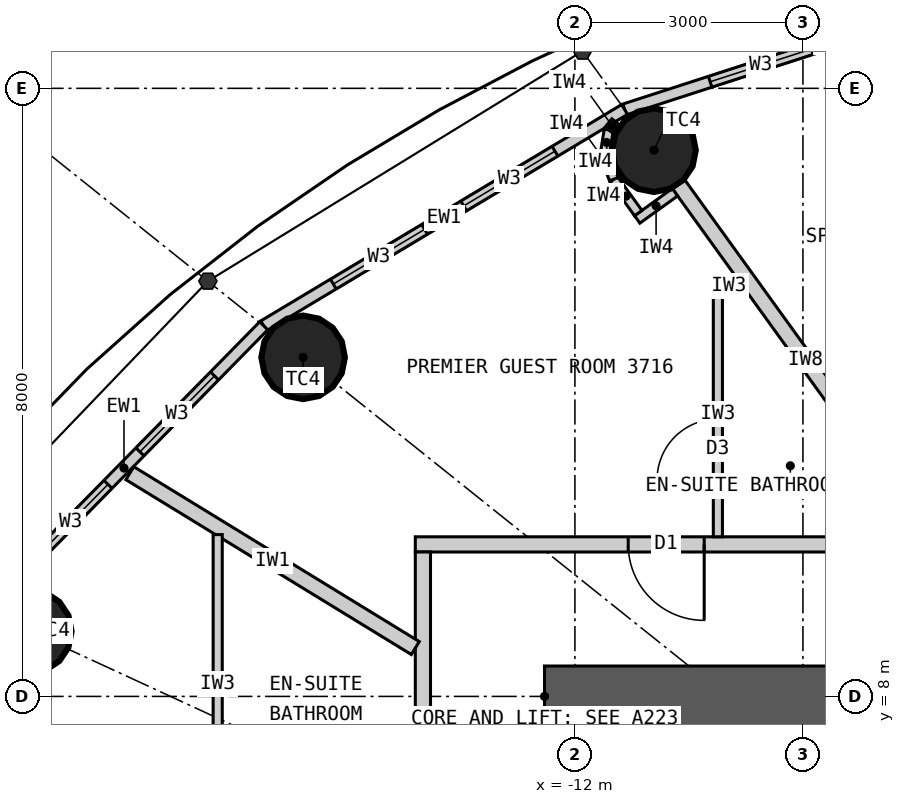
"""IFC4 building model, lengths in metres.
Left out: names, types, materials, properties, quantities, classifications, styles, units other than length and angle.
Written with IfcOpenShell. Run it as: python <this file> out.ifc"""

import sys

from ifc_helpers import new_model, si_unit, direction, frame, frame_2d, origin, origin_2d, place, context, subcontext, project, spatial, rectangle, circle, extrude, element, fill, save


model = new_model("IFC4")
c1 = context("Model", 3, precision=1e-05, world=origin(), true_north=direction((0.0, 1.0)))
c2 = subcontext(c1, "Body", "Model", "MODEL_VIEW")
j1 = project(units=[si_unit("LENGTHUNIT", "METRE"), si_unit("PLANEANGLEUNIT", "RADIAN")], contexts=[c1])
p1 = place(None, origin())
s1 = spatial("IfcSite", under=j1, at=p1, CompositionType="ELEMENT")
p2 = place(p1, origin())
s2 = spatial("IfcBuilding", under=s1, at=p2, CompositionType="ELEMENT")
p3 = place(p2, frame((0.0, 0.0, 143.4)))
s3 = spatial("IfcBuildingStorey", under=s2, at=p3, CompositionType="ELEMENT", Elevation=143.4)
for number, where, z_axis, x_axis in (
    (1, (-10.96, 15.186, 0.0), (0.0, 0.0, 1.0), (1.0, 0.0, 0.0)),
    (2, (-15.576, 12.461, 0.0), (0.0, 0.0, 1.0), (1.0, 0.0, 0.0)),
    (3, (-19.172, 8.855, 0.0), (0.0, 0.0, 1.0), (1.0, 0.0, 0.0)),
):
    element("IfcColumn", number, at=place(p3, frame(where, z_axis=z_axis, x_axis=x_axis)), inside=s3, PredefinedType="COLUMN", context=c2, shape_type="SweptSolid", body=[
        extrude(circle(Radius=0.55, at=origin_2d()), origin(), (0.0, 0.0, 1.0), 3.3),
    ])
p4 = place(p3, frame((-12.4, 8.0, 0.0), z_axis=(0.0, 0.0, 1.0), x_axis=(1.0, 0.0, 0.0)))
e4 = element("IfcWall", 4, at=p4, inside=s3, PredefinedType="SHEAR", context=c2, shape_type="SweptSolid", body=[
    extrude(rectangle(XDim=24.8, YDim=0.8, at=frame_2d((12.4, 0.0))), origin(), (0.0, 0.0, 1.0), 3.3),
])
p5 = place(p4, frame((11.1, 0.0, 0.0)))
e5 = element("IfcOpeningElement", 5, at=p5, cuts=e4, PredefinedType="OPENING", context=c2, shape_type="SweptSolid", body=[
    extrude(rectangle(XDim=1.2, YDim=2.2, at=frame_2d((0.6, 1.1))), frame((0.0, 0.41, 0.0), z_axis=(0.0, -1.0, 0.0), x_axis=(1.0, 0.0, 0.0)), (0.0, 0.0, 1.0), 0.82),
])
p6 = place(p4, frame((18.7, 0.0, 0.0)))
e6 = element("IfcOpeningElement", 6, at=p6, cuts=e4, PredefinedType="OPENING", context=c2, shape_type="SweptSolid", body=[
    extrude(rectangle(XDim=0.9, YDim=2.2, at=frame_2d((0.45, 1.1))), frame((0.0, 0.41, 0.0), z_axis=(0.0, -1.0, 0.0), x_axis=(1.0, 0.0, 0.0)), (0.0, 0.0, 1.0), 0.82),
])
p7 = place(p3, frame((-5.86, 17.497, 0.0), z_axis=(0.0, 0.0, 1.0), x_axis=(-0.951432482129, -0.307857486429, 0.0)))
e7 = element("IfcWall", 7, at=p7, inside=s3, PredefinedType="ELEMENTEDWALL", context=c2, shape_type="SweptSolid", body=[
    extrude(rectangle(XDim=5.766, YDim=0.15, at=frame_2d((2.883, 0.0))), origin(), (0.0, 0.0, 1.0), 3.12),
])
p8 = place(p7, frame((1.183, 0.0, 0.9)))
e8 = element("IfcOpeningElement", 8, at=p8, cuts=e7, PredefinedType="OPENING", context=c2, shape_type="SweptSolid", body=[
    extrude(rectangle(XDim=1.4, YDim=1.9, at=frame_2d((0.7, 0.95))), frame((0.0, 0.085, 0.0), z_axis=(0.0, -1.0, 0.0), x_axis=(1.0, 0.0, 0.0)), (0.0, 0.0, 1.0), 0.17),
])
p9 = place(p7, frame((3.183, 0.0, 0.9)))
e9 = element("IfcOpeningElement", 9, at=p9, cuts=e7, PredefinedType="OPENING", context=c2, shape_type="SweptSolid", body=[
    extrude(rectangle(XDim=1.4, YDim=1.9, at=frame_2d((0.7, 0.95))), frame((0.0, 0.085, 0.0), z_axis=(0.0, -1.0, 0.0), x_axis=(1.0, 0.0, 0.0)), (0.0, 0.0, 1.0), 0.17),
])
p10 = place(p3, frame((-11.346, 15.722, 0.0), z_axis=(0.0, 0.0, 1.0), x_axis=(-0.857695199231, -0.514158482587, 0.0)))
e10 = element("IfcWall", 10, at=p10, inside=s3, PredefinedType="ELEMENTEDWALL", context=c2, shape_type="SweptSolid", body=[
    extrude(rectangle(XDim=5.536, YDim=0.15, at=frame_2d((2.768, 0.0))), origin(), (0.0, 0.0, 1.0), 3.12),
])
p11 = place(p10, frame((1.068, 0.0, 0.9)))
e11 = element("IfcOpeningElement", 11, at=p11, cuts=e10, PredefinedType="OPENING", context=c2, shape_type="SweptSolid", body=[
    extrude(rectangle(XDim=1.4, YDim=1.9, at=frame_2d((0.7, 0.95))), frame((0.0, 0.085, 0.0), z_axis=(0.0, -1.0, 0.0), x_axis=(1.0, 0.0, 0.0)), (0.0, 0.0, 1.0), 0.17),
])
p12 = place(p10, frame((3.068, 0.0, 0.9)))
e12 = element("IfcOpeningElement", 12, at=p12, cuts=e10, PredefinedType="OPENING", context=c2, shape_type="SweptSolid", body=[
    extrude(rectangle(XDim=1.4, YDim=1.9, at=frame_2d((0.7, 0.95))), frame((0.0, 0.085, 0.0), z_axis=(0.0, -1.0, 0.0), x_axis=(1.0, 0.0, 0.0)), (0.0, 0.0, 1.0), 0.17),
])
p13 = place(p3, frame((-16.095, 12.876, 0.0), z_axis=(0.0, 0.0, 1.0), x_axis=(-0.700727467776, -0.71342905457, 0.0)))
e13 = element("IfcWall", 13, at=p13, inside=s3, PredefinedType="ELEMENTEDWALL", context=c2, shape_type="SweptSolid", body=[
    extrude(rectangle(XDim=5.247, YDim=0.15, at=frame_2d((2.624, 0.0))), origin(), (0.0, 0.0, 1.0), 3.12),
])
p14 = place(p13, frame((0.924, 0.0, 0.9)))
e14 = element("IfcOpeningElement", 14, at=p14, cuts=e13, PredefinedType="OPENING", context=c2, shape_type="SweptSolid", body=[
    extrude(rectangle(XDim=1.4, YDim=1.9, at=frame_2d((0.7, 0.95))), frame((0.0, 0.085, 0.0), z_axis=(0.0, -1.0, 0.0), x_axis=(1.0, 0.0, 0.0)), (0.0, 0.0, 1.0), 0.17),
])
p15 = place(p13, frame((2.924, 0.0, 0.9)))
e15 = element("IfcOpeningElement", 15, at=p15, cuts=e13, PredefinedType="OPENING", context=c2, shape_type="SweptSolid", body=[
    extrude(rectangle(XDim=1.4, YDim=1.9, at=frame_2d((0.7, 0.95))), frame((0.0, 0.085, 0.0), z_axis=(0.0, -1.0, 0.0), x_axis=(1.0, 0.0, 0.0)), (0.0, 0.0, 1.0), 0.17),
])
p16 = place(p3, frame((-14.1, 10.0, 0.0), z_axis=(0.0, 0.0, 1.0), x_axis=(1.0, 0.0, 0.0)))
e16 = element("IfcWall", 16, at=p16, inside=s3, PredefinedType="PARTITIONING", context=c2, shape_type="SweptSolid", body=[
    extrude(rectangle(XDim=28.2, YDim=0.2, at=frame_2d((14.1, 0.0))), origin(), (0.0, 0.0, 1.0), 3.12),
])
p17 = place(p16, frame((23.045, 0.0, 0.0)))
e17 = element("IfcOpeningElement", 17, at=p17, cuts=e16, PredefinedType="OPENING", context=c2, shape_type="SweptSolid", body=[
    extrude(rectangle(XDim=1.0, YDim=2.2, at=frame_2d((0.5, 1.1))), frame((0.0, 0.11, 0.0), z_axis=(0.0, -1.0, 0.0), x_axis=(1.0, 0.0, 0.0)), (0.0, 0.0, 1.0), 0.22),
])
p18 = place(p16, frame((17.829, 0.0, 0.0)))
e18 = element("IfcOpeningElement", 18, at=p18, cuts=e16, PredefinedType="OPENING", context=c2, shape_type="SweptSolid", body=[
    extrude(rectangle(XDim=1.0, YDim=2.2, at=frame_2d((0.5, 1.1))), frame((0.0, 0.11, 0.0), z_axis=(0.0, -1.0, 0.0), x_axis=(1.0, 0.0, 0.0)), (0.0, 0.0, 1.0), 0.22),
])
p19 = place(p16, frame((12.205, 0.0, 0.0)))
e19 = element("IfcOpeningElement", 19, at=p19, cuts=e16, PredefinedType="OPENING", context=c2, shape_type="SweptSolid", body=[
    extrude(rectangle(XDim=1.0, YDim=2.2, at=frame_2d((0.5, 1.1))), frame((0.0, 0.11, 0.0), z_axis=(0.0, -1.0, 0.0), x_axis=(1.0, 0.0, 0.0)), (0.0, 0.0, 1.0), 0.22),
])
p20 = place(p16, frame((7.857, 0.0, 0.0)))
e20 = element("IfcOpeningElement", 20, at=p20, cuts=e16, PredefinedType="OPENING", context=c2, shape_type="SweptSolid", body=[
    extrude(rectangle(XDim=1.0, YDim=2.2, at=frame_2d((0.5, 1.1))), frame((0.0, 0.11, 0.0), z_axis=(0.0, -1.0, 0.0), x_axis=(1.0, 0.0, 0.0)), (0.0, 0.0, 1.0), 0.22),
])
p21 = place(p16, frame((2.801, 0.0, 0.0)))
e21 = element("IfcOpeningElement", 21, at=p21, cuts=e16, PredefinedType="OPENING", context=c2, shape_type="SweptSolid", body=[
    extrude(rectangle(XDim=1.0, YDim=2.2, at=frame_2d((0.5, 1.1))), frame((0.0, 0.11, 0.0), z_axis=(0.0, -1.0, 0.0), x_axis=(1.0, 0.0, 0.0)), (0.0, 0.0, 1.0), 0.22),
])
p22 = place(p3, frame((-14.0, 9.9, 0.0), z_axis=(0.0, 0.0, 1.0), x_axis=(0.0, -1.0, 0.0)))
e22 = element("IfcWall", 22, at=p22, inside=s3, PredefinedType="PARTITIONING", context=c2, shape_type="SweptSolid", body=[
    extrude(rectangle(XDim=19.8, YDim=0.2, at=frame_2d((9.9, 0.0))), origin(), (0.0, 0.0, 1.0), 3.12),
])
p23 = place(p22, frame((8.718, 0.0, 0.0)))
e23 = element("IfcOpeningElement", 23, at=p23, cuts=e22, PredefinedType="OPENING", context=c2, shape_type="SweptSolid", body=[
    extrude(rectangle(XDim=1.0, YDim=2.2, at=frame_2d((0.5, 1.1))), frame((0.0, 0.11, 0.0), z_axis=(0.0, -1.0, 0.0), x_axis=(1.0, 0.0, 0.0)), (0.0, 0.0, 1.0), 0.22),
])
p24 = place(p22, frame((11.74, 0.0, 0.0)))
e24 = element("IfcOpeningElement", 24, at=p24, cuts=e22, PredefinedType="OPENING", context=c2, shape_type="SweptSolid", body=[
    extrude(rectangle(XDim=1.0, YDim=2.2, at=frame_2d((0.5, 1.1))), frame((0.0, 0.11, 0.0), z_axis=(0.0, -1.0, 0.0), x_axis=(1.0, 0.0, 0.0)), (0.0, 0.0, 1.0), 0.22),
])
p25 = place(p22, frame((14.782, 0.0, 0.0)))
e25 = element("IfcOpeningElement", 25, at=p25, cuts=e22, PredefinedType="OPENING", context=c2, shape_type="SweptSolid", body=[
    extrude(rectangle(XDim=1.0, YDim=2.2, at=frame_2d((0.5, 1.1))), frame((0.0, 0.11, 0.0), z_axis=(0.0, -1.0, 0.0), x_axis=(1.0, 0.0, 0.0)), (0.0, 0.0, 1.0), 0.22),
])
p26 = place(p22, frame((17.707, 0.0, 0.0)))
e26 = element("IfcOpeningElement", 26, at=p26, cuts=e22, PredefinedType="OPENING", context=c2, shape_type="SweptSolid", body=[
    extrude(rectangle(XDim=1.0, YDim=2.2, at=frame_2d((0.5, 1.1))), frame((0.0, 0.11, 0.0), z_axis=(0.0, -1.0, 0.0), x_axis=(1.0, 0.0, 0.0)), (0.0, 0.0, 1.0), 0.22),
])
p27 = place(p22, frame((3.824, 0.0, 0.0)))
e27 = element("IfcOpeningElement", 27, at=p27, cuts=e22, PredefinedType="OPENING", context=c2, shape_type="SweptSolid", body=[
    extrude(rectangle(XDim=1.0, YDim=2.2, at=frame_2d((0.5, 1.1))), frame((0.0, 0.11, 0.0), z_axis=(0.0, -1.0, 0.0), x_axis=(1.0, 0.0, 0.0)), (0.0, 0.0, 1.0), 0.22),
])
p28 = place(p3, frame((-7.289, 10.1, 0.0), z_axis=(0.0, 0.0, 1.0), x_axis=(-0.585222595178, 0.810872686735, 0.0)))
e28 = element("IfcWall", 28, at=p28, inside=s3, PredefinedType="PARTITIONING", context=c2, shape_type="SweptSolid", body=[
    extrude(rectangle(XDim=5.722, YDim=0.2, at=frame_2d((2.861, 0.0))), origin(), (0.0, 0.0, 1.0), 2.27),
])
p29 = place(p3, frame((-14.1, 8.636, 0.0), z_axis=(0.0, 0.0, 1.0), x_axis=(-0.852731884196, 0.522348862041, 0.0)))
e29 = element("IfcWall", 29, at=p29, inside=s3, PredefinedType="PARTITIONING", context=c2, shape_type="SweptSolid", body=[
    extrude(rectangle(XDim=4.404, YDim=0.2, at=frame_2d((2.202, 0.0))), origin(), (0.0, 0.0, 1.0), 3.12),
])
p30 = place(p3, frame((-9.771, 13.4, 0.0), z_axis=(0.0, 0.0, 1.0), x_axis=(-1.0, 0.0, 0.0)))
e30 = element("IfcWall", 30, at=p30, inside=s3, PredefinedType="PARTITIONING", context=c2, shape_type="SweptSolid", body=[
    extrude(rectangle(XDim=0.408, YDim=0.12, at=frame_2d((0.204, 0.0))), origin(), (0.0, 0.0, 1.0), 3.12),
])
p31 = place(p3, frame((-10.119, 10.1, 0.0), z_axis=(0.0, 0.0, 1.0), x_axis=(0.0, 1.0, 0.0)))
e31 = element("IfcWall", 31, at=p31, inside=s3, PredefinedType="PARTITIONING", context=c2, shape_type="SweptSolid", body=[
    extrude(rectangle(XDim=3.24, YDim=0.12, at=frame_2d((1.62, 0.0))), origin(), (0.0, 0.0, 1.0), 3.12),
])
p32 = place(p31, frame((0.75, 0.0, 0.0)))
e32 = element("IfcOpeningElement", 32, at=p32, cuts=e31, PredefinedType="OPENING", context=c2, shape_type="SweptSolid", body=[
    extrude(rectangle(XDim=0.8, YDim=2.1, at=frame_2d((0.4, 1.05))), frame((0.0, 0.07, 0.0), z_axis=(0.0, -1.0, 0.0), x_axis=(1.0, 0.0, 0.0)), (0.0, 0.0, 1.0), 0.14),
])
p33 = place(p3, frame((-16.7, 10.129, 0.0), z_axis=(0.0, 0.0, 1.0), x_axis=(0.0, -1.0, 0.0)))
e33 = element("IfcWall", 33, at=p33, inside=s3, PredefinedType="PARTITIONING", context=c2, shape_type="SweptSolid", body=[
    extrude(rectangle(XDim=3.933, YDim=0.12, at=frame_2d((1.966, 0.0))), origin(), (0.0, 0.0, 1.0), 3.12),
])
p34 = place(p3, frame((-10.684, 14.633, 0.0), z_axis=(0.0, 0.0, 1.0), x_axis=(-0.810921075692, -0.585155542568, 0.0)))
e34 = element("IfcWall", 34, at=p34, inside=s3, PredefinedType="PARTITIONING", context=c2, shape_type="SweptSolid", body=[
    extrude(rectangle(XDim=0.612, YDim=0.12, at=frame_2d((0.306, 0.0))), origin(), (0.0, 0.0, 1.0), 3.12),
])
p35 = place(p3, frame((-11.167, 14.359, 0.0), z_axis=(0.0, 0.0, 1.0), x_axis=(-0.585263549799, 0.810843127415, 0.0)))
e35 = element("IfcWall", 35, at=p35, inside=s3, PredefinedType="PARTITIONING", context=c2, shape_type="SweptSolid", body=[
    extrude(rectangle(XDim=0.55, YDim=0.12, at=frame_2d((0.275, 0.0))), origin(), (0.0, 0.0, 1.0), 3.12),
])
for number, where, z_axis, x_axis in (
    (36, (-11.489, 14.804, 0.0), (0.0, 0.0, 1.0), (-0.356, 0.935, 0.0)),
    (37, (-11.609, 15.12, 0.0), (0.0, 0.0, 1.0), (0.16, 0.987, 0.0)),
):
    element("IfcWall", number, at=place(p3, frame(where, z_axis=z_axis, x_axis=x_axis)), inside=s3, PredefinedType="PARTITIONING", context=c2, shape_type="SweptSolid", body=[
        extrude(rectangle(XDim=0.338, YDim=0.12, at=frame_2d((0.169, 0.0))), origin(), (0.0, 0.0, 1.0), 3.12),
    ])
p36 = place(p3, frame((-11.555, 15.453, 0.0), z_axis=(0.0, 0.0, 1.0), x_axis=(0.631711901025, 0.775203246964, 0.0)))
e38 = element("IfcWall", 38, at=p36, inside=s3, PredefinedType="PARTITIONING", context=c2, shape_type="SweptSolid", body=[
    extrude(rectangle(XDim=0.139, YDim=0.12, at=frame_2d((0.07, 0.0))), origin(), (0.0, 0.0, 1.0), 3.12),
])
p37 = place(p9, origin())
e39 = element("IfcWindow", 39, at=p37, inside=s3, PartitioningType="SINGLE_PANEL", PredefinedType="WINDOW", context=c2, shape_type="SweptSolid", body=[
    extrude(rectangle(XDim=1.4, YDim=1.9, at=frame_2d((0.7, 0.95))), frame((0.0, 0.03, 0.0), z_axis=(0.0, -1.0, 0.0), x_axis=(1.0, 0.0, 0.0)), (0.0, 0.0, 1.0), 0.06),
])
fill(e9, e39)
p38 = place(p11, origin())
e40 = element("IfcWindow", 40, at=p38, inside=s3, PartitioningType="SINGLE_PANEL", PredefinedType="WINDOW", context=c2, shape_type="SweptSolid", body=[
    extrude(rectangle(XDim=1.4, YDim=1.9, at=frame_2d((0.7, 0.95))), frame((0.0, 0.03, 0.0), z_axis=(0.0, -1.0, 0.0), x_axis=(1.0, 0.0, 0.0)), (0.0, 0.0, 1.0), 0.06),
])
fill(e11, e40)
p39 = place(p12, origin())
e41 = element("IfcWindow", 41, at=p39, inside=s3, PartitioningType="SINGLE_PANEL", PredefinedType="WINDOW", context=c2, shape_type="SweptSolid", body=[
    extrude(rectangle(XDim=1.4, YDim=1.9, at=frame_2d((0.7, 0.95))), frame((0.0, 0.03, 0.0), z_axis=(0.0, -1.0, 0.0), x_axis=(1.0, 0.0, 0.0)), (0.0, 0.0, 1.0), 0.06),
])
fill(e12, e41)
p40 = place(p14, origin())
e42 = element("IfcWindow", 42, at=p40, inside=s3, PartitioningType="SINGLE_PANEL", PredefinedType="WINDOW", context=c2, shape_type="SweptSolid", body=[
    extrude(rectangle(XDim=1.4, YDim=1.9, at=frame_2d((0.7, 0.95))), frame((0.0, 0.03, 0.0), z_axis=(0.0, -1.0, 0.0), x_axis=(1.0, 0.0, 0.0)), (0.0, 0.0, 1.0), 0.06),
])
fill(e14, e42)
p41 = place(p15, origin())
e43 = element("IfcWindow", 43, at=p41, inside=s3, PartitioningType="SINGLE_PANEL", PredefinedType="WINDOW", context=c2, shape_type="SweptSolid", body=[
    extrude(rectangle(XDim=1.4, YDim=1.9, at=frame_2d((0.7, 0.95))), frame((0.0, 0.03, 0.0), z_axis=(0.0, -1.0, 0.0), x_axis=(1.0, 0.0, 0.0)), (0.0, 0.0, 1.0), 0.06),
])
fill(e15, e43)
p42 = place(p32, origin())
e44 = element("IfcDoor", 44, at=p42, inside=s3, OperationType="SINGLE_SWING_LEFT", PredefinedType="DOOR", context=c2, shape_type="SweptSolid", body=[
    extrude(rectangle(XDim=0.8, YDim=2.1, at=frame_2d((0.4, 1.05))), frame((0.0, 0.025, 0.0), z_axis=(0.0, -1.0, 0.0), x_axis=(1.0, 0.0, 0.0)), (0.0, 0.0, 1.0), 0.05),
])
fill(e32, e44)
p43 = place(p21, origin())
e45 = element("IfcDoor", 45, at=p43, inside=s3, OperationType="SINGLE_SWING_RIGHT", PredefinedType="DOOR", context=c2, shape_type="SweptSolid", body=[
    extrude(rectangle(XDim=1.0, YDim=2.2, at=frame_2d((0.5, 1.1))), frame((0.0, 0.025, 0.0), z_axis=(0.0, -1.0, 0.0), x_axis=(1.0, 0.0, 0.0)), (0.0, 0.0, 1.0), 0.05),
])
fill(e21, e45)
save(model, sys.argv[1])
